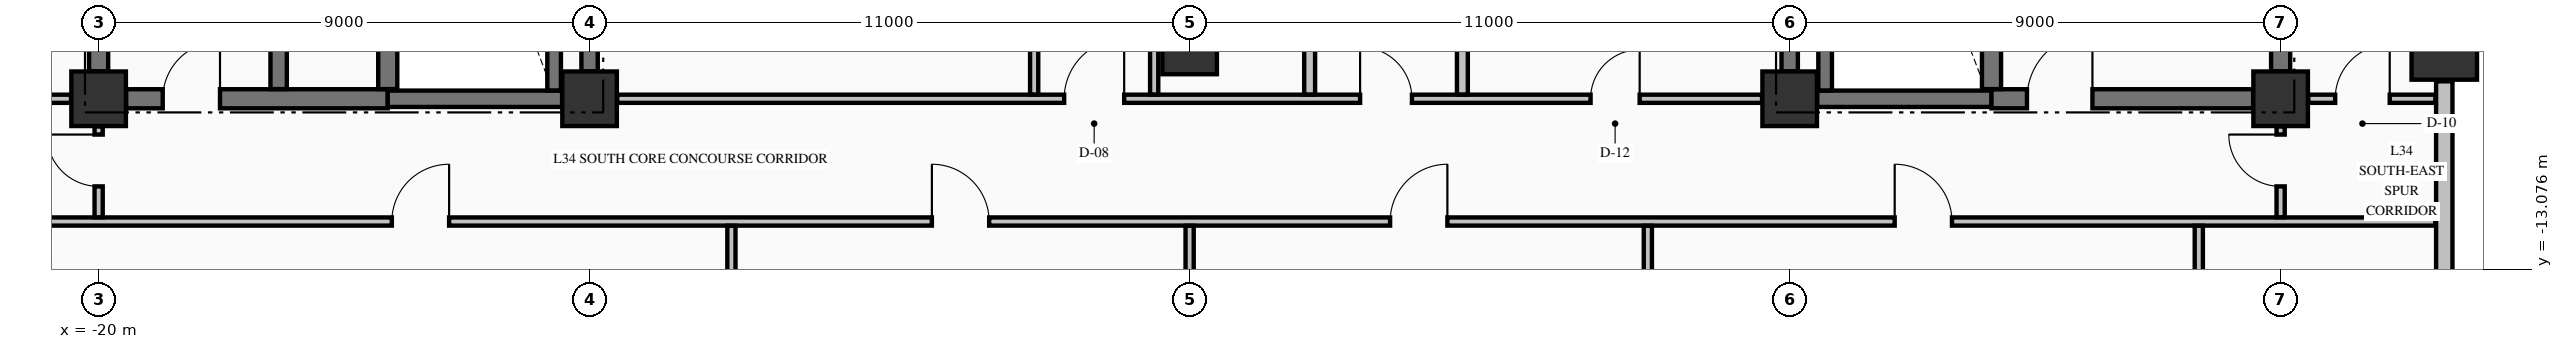
"""IFC4 building model, lengths in metres.
Left out: names, types, materials, properties, quantities, classifications, styles, units other than length and angle.
Written with IfcOpenShell. Run it as: python <this file> out.ifc"""

import sys

from ifc_helpers import new_model, si_unit, direction, frame, frame_2d, origin, origin_2d, place, context, subcontext, project, spatial, rectangle, extrude, element, fill, save


model = new_model("IFC4")
c1 = context("Model", 3, precision=1e-05, world=origin(), true_north=direction((0.0, 1.0)))
c2 = subcontext(c1, "Body", "Model", "MODEL_VIEW")
j1 = project(units=[si_unit("LENGTHUNIT", "METRE"), si_unit("PLANEANGLEUNIT", "RADIAN")], contexts=[c1])
p1 = place(None, origin())
s1 = spatial("IfcSite", under=j1, at=p1, CompositionType="ELEMENT")
p2 = place(p1, origin())
s2 = spatial("IfcBuilding", under=s1, at=p2, CompositionType="ELEMENT")
p3 = place(p2, frame((0.0, 0.0, 135.63)))
s3 = spatial("IfcBuildingStorey", under=s2, at=p3, CompositionType="ELEMENT", Elevation=135.63)
p4 = place(p3, frame((23.0, -9.0, -0.25), z_axis=(0.0, 0.0, 1.0), x_axis=(1.0, 0.0, 0.0)))
e1 = element("IfcColumn", 1, at=p4, inside=s3, PredefinedType="COLUMN", context=c2, shape_type="SweptSolid", body=[
    extrude(rectangle(XDim=1.2, YDim=1.2, at=origin_2d()), origin(), (0.0, 0.0, 1.0), 3.57),
])
for number, where, z_axis, x_axis in (
    (2, (-20.0, -9.95, -0.25), (0.0, 0.0, 1.0), (1.0, 0.0, 0.0)),
    (3, (-11.0, -9.95, -0.25), (0.0, 0.0, 1.0), (1.0, 0.0, 0.0)),
    (4, (11.0, -9.95, -0.25), (0.0, 0.0, 1.0), (1.0, 0.0, 0.0)),
    (5, (20.0, -9.95, -0.25), (0.0, 0.0, 1.0), (1.0, 0.0, 0.0)),
    (6, (0.0, -9.0, -0.25), (0.0, 0.0, 1.0), (1.0, 0.0, 0.0)),
):
    element("IfcColumn", number, at=place(p3, frame(where, z_axis=z_axis, x_axis=x_axis)), inside=s3, PredefinedType="COLUMN", context=c2, shape_type="SweptSolid", body=[
        extrude(rectangle(XDim=1.0, YDim=1.0, at=origin_2d()), origin(), (0.0, 0.0, 1.0), 3.57),
    ])
p5 = place(p3, frame((23.0, -20.37, 0.0), z_axis=(0.0, 0.0, 1.0), x_axis=(0.0, 1.0, 0.0)))
e7 = element("IfcWall", 7, at=p5, inside=s3, PredefinedType="STANDARD", context=c2, shape_type="SweptSolid", body=[
    extrude(rectangle(XDim=10.74, YDim=0.3, at=frame_2d((5.37, 0.0))), origin(), (0.0, 0.0, 1.0), 2.712),
])
p6 = place(p3, frame((-19.496, -9.95, 0.0), z_axis=(0.0, 0.0, 1.0), x_axis=(1.0, 0.0, 0.0)))
e8 = element("IfcWall", 8, at=p6, inside=s3, PredefinedType="SHEAR", context=c2, shape_type="SweptSolid", body=[
    extrude(rectangle(XDim=4.796, YDim=0.35, at=frame_2d((2.398, 0.0))), origin(), (0.0, 0.0, 1.0), 3.32),
])
p7 = place(p6, frame((0.671, 0.0, 0.0)))
e9 = element("IfcOpeningElement", 9, at=p7, cuts=e8, PredefinedType="OPENING", context=c2, shape_type="SweptSolid", body=[
    extrude(rectangle(XDim=1.05, YDim=2.15, at=frame_2d((0.525, 1.075))), frame((0.0, 0.185, 0.0), z_axis=(0.0, -1.0, 0.0), x_axis=(1.0, 0.0, 0.0)), (0.0, 0.0, 1.0), 0.37),
])
for number, where, z_axis, x_axis in (
    (10, (-14.7, -9.95, 0.0), (0.0, 0.0, 1.0), (1.0, 0.0, 0.0)),
    (11, (11.504, -9.95, 0.0), (0.0, 0.0, 1.0), (1.0, 0.0, 0.0)),
):
    element("IfcWall", number, at=place(p3, frame(where, z_axis=z_axis, x_axis=x_axis)), inside=s3, PredefinedType="SHEAR", context=c2, shape_type="SweptSolid", body=[
        extrude(rectangle(XDim=3.196, YDim=0.3, at=frame_2d((1.598, 0.0))), origin(), (0.0, 0.0, 1.0), 3.32),
    ])
p8 = place(p3, frame((14.7, -9.95, 0.0), z_axis=(0.0, 0.0, 1.0), x_axis=(1.0, 0.0, 0.0)))
e12 = element("IfcWall", 12, at=p8, inside=s3, PredefinedType="SHEAR", context=c2, shape_type="SweptSolid", body=[
    extrude(rectangle(XDim=4.796, YDim=0.35, at=frame_2d((2.398, 0.0))), origin(), (0.0, 0.0, 1.0), 3.32),
])
p9 = place(p8, frame((0.65, 0.0, 0.0)))
e13 = element("IfcOpeningElement", 13, at=p9, cuts=e12, PredefinedType="OPENING", context=c2, shape_type="SweptSolid", body=[
    extrude(rectangle(XDim=1.2, YDim=2.15, at=frame_2d((0.6, 1.075))), frame((0.0, 0.185, 0.0), z_axis=(0.0, -1.0, 0.0), x_axis=(1.0, 0.0, 0.0)), (0.0, 0.0, 1.0), 0.37),
])
p10 = place(p3, frame((-27.835, -12.2, 0.0), z_axis=(0.0, 0.0, 1.0), x_axis=(1.0, 0.0, 0.0)))
e14 = element("IfcWall", 14, at=p10, inside=s3, PredefinedType="PARTITIONING", context=c2, shape_type="SweptSolid", body=[
    extrude(rectangle(XDim=50.67, YDim=0.15, at=frame_2d((25.335, 0.0))), origin(), (0.0, 0.0, 1.0), 3.32),
])
p11 = place(p10, frame((13.21, 0.0, 0.0)))
e15 = element("IfcOpeningElement", 15, at=p11, cuts=e14, PredefinedType="OPENING", context=c2, shape_type="SweptSolid", body=[
    extrude(rectangle(XDim=1.05, YDim=2.15, at=frame_2d((0.525, 1.075))), frame((0.0, 0.085, 0.0), z_axis=(0.0, -1.0, 0.0), x_axis=(1.0, 0.0, 0.0)), (0.0, 0.0, 1.0), 0.17),
])
p12 = place(p10, frame((23.11, 0.0, 0.0)))
e16 = element("IfcOpeningElement", 16, at=p12, cuts=e14, PredefinedType="OPENING", context=c2, shape_type="SweptSolid", body=[
    extrude(rectangle(XDim=1.05, YDim=2.15, at=frame_2d((0.525, 1.075))), frame((0.0, 0.085, 0.0), z_axis=(0.0, -1.0, 0.0), x_axis=(1.0, 0.0, 0.0)), (0.0, 0.0, 1.0), 0.17),
])
p13 = place(p10, frame((31.51, 0.0, 0.0)))
e17 = element("IfcOpeningElement", 17, at=p13, cuts=e14, PredefinedType="OPENING", context=c2, shape_type="SweptSolid", body=[
    extrude(rectangle(XDim=1.05, YDim=2.15, at=frame_2d((0.525, 1.075))), frame((0.0, 0.085, 0.0), z_axis=(0.0, -1.0, 0.0), x_axis=(1.0, 0.0, 0.0)), (0.0, 0.0, 1.0), 0.17),
])
p14 = place(p10, frame((40.76, 0.0, 0.0)))
e18 = element("IfcOpeningElement", 18, at=p14, cuts=e14, PredefinedType="OPENING", context=c2, shape_type="SweptSolid", body=[
    extrude(rectangle(XDim=1.05, YDim=2.15, at=frame_2d((0.525, 1.075))), frame((0.0, 0.085, 0.0), z_axis=(0.0, -1.0, 0.0), x_axis=(1.0, 0.0, 0.0)), (0.0, 0.0, 1.0), 0.17),
])
p15 = place(p3, frame((-27.835, -9.95, 0.0), z_axis=(0.0, 0.0, 1.0), x_axis=(1.0, 0.0, 0.0)))
e19 = element("IfcWall", 19, at=p15, inside=s3, PredefinedType="PARTITIONING", context=c2, shape_type="SweptSolid", body=[
    extrude(rectangle(XDim=7.329, YDim=0.15, at=frame_2d((3.665, 0.0))), origin(), (0.0, 0.0, 1.0), 3.32),
])
p16 = place(p15, frame((3.36, 0.0, 0.0)))
e20 = element("IfcOpeningElement", 20, at=p16, cuts=e19, PredefinedType="OPENING", context=c2, shape_type="SweptSolid", body=[
    extrude(rectangle(XDim=0.95, YDim=2.15, at=frame_2d((0.475, 1.075))), frame((0.0, 0.085, 0.0), z_axis=(0.0, -1.0, 0.0), x_axis=(1.0, 0.0, 0.0)), (0.0, 0.0, 1.0), 0.17),
])
p17 = place(p3, frame((-10.494, -9.95, 0.0), z_axis=(0.0, 0.0, 1.0), x_axis=(1.0, 0.0, 0.0)))
e21 = element("IfcWall", 21, at=p17, inside=s3, PredefinedType="PARTITIONING", context=c2, shape_type="SweptSolid", body=[
    extrude(rectangle(XDim=20.988, YDim=0.15, at=frame_2d((10.494, 0.0))), origin(), (0.0, 0.0, 1.0), 3.32),
])
p18 = place(p17, frame((8.194, 0.0, 0.0)))
e22 = element("IfcOpeningElement", 22, at=p18, cuts=e21, PredefinedType="OPENING", context=c2, shape_type="SweptSolid", body=[
    extrude(rectangle(XDim=1.1, YDim=2.15, at=frame_2d((0.55, 1.075))), frame((0.0, 0.085, 0.0), z_axis=(0.0, -1.0, 0.0), x_axis=(1.0, 0.0, 0.0)), (0.0, 0.0, 1.0), 0.17),
])
p19 = place(p17, frame((13.619, 0.0, 0.0)))
e23 = element("IfcOpeningElement", 23, at=p19, cuts=e21, PredefinedType="OPENING", context=c2, shape_type="SweptSolid", body=[
    extrude(rectangle(XDim=0.95, YDim=2.15, at=frame_2d((0.475, 1.075))), frame((0.0, 0.085, 0.0), z_axis=(0.0, -1.0, 0.0), x_axis=(1.0, 0.0, 0.0)), (0.0, 0.0, 1.0), 0.17),
])
p20 = place(p17, frame((17.844, 0.0, 0.0)))
e24 = element("IfcOpeningElement", 24, at=p20, cuts=e21, PredefinedType="OPENING", context=c2, shape_type="SweptSolid", body=[
    extrude(rectangle(XDim=0.9, YDim=2.15, at=frame_2d((0.45, 1.075))), frame((0.0, 0.085, 0.0), z_axis=(0.0, -1.0, 0.0), x_axis=(1.0, 0.0, 0.0)), (0.0, 0.0, 1.0), 0.17),
])
p21 = place(p3, frame((20.506, -9.95, 0.0), z_axis=(0.0, 0.0, 1.0), x_axis=(1.0, 0.0, 0.0)))
e25 = element("IfcWall", 25, at=p21, inside=s3, PredefinedType="PARTITIONING", context=c2, shape_type="SweptSolid", body=[
    extrude(rectangle(XDim=2.329, YDim=0.15, at=frame_2d((1.165, 0.0))), origin(), (0.0, 0.0, 1.0), 3.32),
])
p22 = place(p21, frame((0.494, 0.0, 0.0)))
e26 = element("IfcOpeningElement", 26, at=p22, cuts=e25, PredefinedType="OPENING", context=c2, shape_type="SweptSolid", body=[
    extrude(rectangle(XDim=1.0, YDim=2.15, at=frame_2d((0.5, 1.075))), frame((0.0, 0.085, 0.0), z_axis=(0.0, -1.0, 0.0), x_axis=(1.0, 0.0, 0.0)), (0.0, 0.0, 1.0), 0.17),
])
p23 = place(p3, frame((-20.0, -9.446, 0.0), z_axis=(0.0, 0.0, 1.0), x_axis=(0.0, 1.0, 0.0)))
e27 = element("IfcWall", 27, at=p23, inside=s3, PredefinedType="SHEAR", context=c2, shape_type="SweptSolid", body=[
    extrude(rectangle(XDim=8.942, YDim=0.35, at=frame_2d((4.471, 0.0))), origin(), (0.0, 0.0, 1.0), 3.32),
])
p24 = place(p3, frame((-16.7, -9.773, 0.0), z_axis=(0.0, 0.0, 1.0), x_axis=(0.0, 1.0, 0.0)))
e28 = element("IfcWall", 28, at=p24, inside=s3, PredefinedType="SHEAR", context=c2, shape_type="SweptSolid", body=[
    extrude(rectangle(XDim=9.371, YDim=0.3, at=frame_2d((4.686, 0.0))), origin(), (0.0, 0.0, 1.0), 3.32),
])
p25 = place(p3, frame((-14.7, -9.773, 0.0), z_axis=(0.0, 0.0, 1.0), x_axis=(0.0, 1.0, 0.0)))
e29 = element("IfcWall", 29, at=p25, inside=s3, PredefinedType="SHEAR", context=c2, shape_type="SweptSolid", body=[
    extrude(rectangle(XDim=9.371, YDim=0.35, at=frame_2d((4.686, 0.0))), origin(), (0.0, 0.0, 1.0), 3.32),
])
p26 = place(p3, frame((-11.65, -9.798, 0.0), z_axis=(0.0, 0.0, 1.0), x_axis=(0.0, 1.0, 0.0)))
e30 = element("IfcWall", 30, at=p26, inside=s3, PredefinedType="SOLIDWALL", context=c2, shape_type="SweptSolid", body=[
    extrude(rectangle(XDim=9.396, YDim=0.25, at=frame_2d((4.698, 0.0))), origin(), (0.0, 0.0, 1.0), 3.32),
])
for number, where, z_axis, x_axis in (
    (31, (-11.0, -9.446, 0.0), (0.0, 0.0, 1.0), (0.0, 1.0, 0.0)),
    (32, (11.0, -9.446, 0.0), (0.0, 0.0, 1.0), (0.0, 1.0, 0.0)),
):
    element("IfcWall", number, at=place(p3, frame(where, z_axis=z_axis, x_axis=x_axis)), inside=s3, PredefinedType="SHEAR", context=c2, shape_type="SweptSolid", body=[
        extrude(rectangle(XDim=8.942, YDim=0.3, at=frame_2d((4.471, 0.0))), origin(), (0.0, 0.0, 1.0), 3.32),
    ])
p27 = place(p3, frame((11.65, -9.798, 0.0), z_axis=(0.0, 0.0, 1.0), x_axis=(0.0, 1.0, 0.0)))
e33 = element("IfcWall", 33, at=p27, inside=s3, PredefinedType="SOLIDWALL", context=c2, shape_type="SweptSolid", body=[
    extrude(rectangle(XDim=9.396, YDim=0.25, at=frame_2d((4.698, 0.0))), origin(), (0.0, 0.0, 1.0), 3.32),
])
p28 = place(p3, frame((14.7, -9.773, 0.0), z_axis=(0.0, 0.0, 1.0), x_axis=(0.0, 1.0, 0.0)))
e34 = element("IfcWall", 34, at=p28, inside=s3, PredefinedType="SHEAR", context=c2, shape_type="SweptSolid", body=[
    extrude(rectangle(XDim=9.371, YDim=0.35, at=frame_2d((4.686, 0.0))), origin(), (0.0, 0.0, 1.0), 3.32),
])
p29 = place(p3, frame((20.0, -9.446, 0.0), z_axis=(0.0, 0.0, 1.0), x_axis=(0.0, 1.0, 0.0)))
e35 = element("IfcWall", 35, at=p29, inside=s3, PredefinedType="SHEAR", context=c2, shape_type="SweptSolid", body=[
    extrude(rectangle(XDim=2.269, YDim=0.35, at=frame_2d((1.135, 0.0))), origin(), (0.0, 0.0, 1.0), 3.32),
])
p30 = place(p3, frame((-20.0, -12.122, 0.0), z_axis=(0.0, 0.0, 1.0), x_axis=(0.0, 1.0, 0.0)))
e36 = element("IfcWall", 36, at=p30, inside=s3, PredefinedType="PARTITIONING", context=c2, shape_type="SweptSolid", body=[
    extrude(rectangle(XDim=1.666, YDim=0.15, at=frame_2d((0.833, 0.0))), origin(), (0.0, 0.0, 1.0), 2.81),
])
p31 = place(p30, frame((0.566, 0.0, 0.0)))
e37 = element("IfcOpeningElement", 37, at=p31, cuts=e36, PredefinedType="OPENING", context=c2, shape_type="SweptSolid", body=[
    extrude(rectangle(XDim=0.95, YDim=2.15, at=frame_2d((0.475, 1.075))), frame((0.0, 0.085, 0.0), z_axis=(0.0, -1.0, 0.0), x_axis=(1.0, 0.0, 0.0)), (0.0, 0.0, 1.0), 0.17),
])
p32 = place(p3, frame((-8.4, -25.335, 0.0), z_axis=(0.0, 0.0, 1.0), x_axis=(0.0, 1.0, 0.0)))
e38 = element("IfcWall", 38, at=p32, inside=s3, PredefinedType="PARTITIONING", context=c2, shape_type="SweptSolid", body=[
    extrude(rectangle(XDim=13.057, YDim=0.15, at=frame_2d((6.528, 0.0))), origin(), (0.0, 0.0, 1.0), 3.32),
])
p33 = place(p3, frame((-2.85, -9.872, 0.0), z_axis=(0.0, 0.0, 1.0), x_axis=(0.0, 1.0, 0.0)))
e39 = element("IfcWall", 39, at=p33, inside=s3, PredefinedType="PARTITIONING", context=c2, shape_type="SweptSolid", body=[
    extrude(rectangle(XDim=9.544, YDim=0.15, at=frame_2d((4.772, 0.0))), origin(), (0.0, 0.0, 1.0), 3.32),
])
p34 = place(p3, frame((-0.65, -9.872, 0.0), z_axis=(0.0, 0.0, 1.0), x_axis=(0.0, 1.0, 0.0)))
e40 = element("IfcWall", 40, at=p34, inside=s3, PredefinedType="PARTITIONING", context=c2, shape_type="SweptSolid", body=[
    extrude(rectangle(XDim=4.419, YDim=0.15, at=frame_2d((2.209, 0.0))), origin(), (0.0, 0.0, 1.0), 3.32),
])
p35 = place(p34, frame((2.597, 0.0, 0.0)))
e41 = element("IfcOpeningElement", 41, at=p35, cuts=e40, PredefinedType="OPENING", context=c2, shape_type="SweptSolid", body=[
    extrude(rectangle(XDim=0.95, YDim=2.15, at=frame_2d((0.475, 1.075))), frame((0.0, 0.085, 0.0), z_axis=(0.0, -1.0, 0.0), x_axis=(1.0, 0.0, 0.0)), (0.0, 0.0, 1.0), 0.17),
])
p36 = place(p3, frame((0.0, -24.894, 0.0), z_axis=(0.0, 0.0, 1.0), x_axis=(0.0, 1.0, 0.0)))
e42 = element("IfcWall", 42, at=p36, inside=s3, PredefinedType="PARTITIONING", context=c2, shape_type="SweptSolid", body=[
    extrude(rectangle(XDim=12.616, YDim=0.15, at=frame_2d((6.308, 0.0))), origin(), (0.0, 0.0, 1.0), 2.81),
])
for number, where, z_axis, x_axis in (
    (43, (2.2, -9.872, 0.0), (0.0, 0.0, 1.0), (0.0, 1.0, 0.0)),
    (44, (5.0, -9.872, 0.0), (0.0, 0.0, 1.0), (0.0, 1.0, 0.0)),
):
    element("IfcWall", number, at=place(p3, frame(where, z_axis=z_axis, x_axis=x_axis)), inside=s3, PredefinedType="PARTITIONING", context=c2, shape_type="SweptSolid", body=[
        extrude(rectangle(XDim=4.419, YDim=0.2, at=frame_2d((2.209, 0.0))), origin(), (0.0, 0.0, 1.0), 3.32),
    ])
p37 = place(p3, frame((8.4, -25.335, 0.0), z_axis=(0.0, 0.0, 1.0), x_axis=(0.0, 1.0, 0.0)))
e45 = element("IfcWall", 45, at=p37, inside=s3, PredefinedType="PARTITIONING", context=c2, shape_type="SweptSolid", body=[
    extrude(rectangle(XDim=13.057, YDim=0.15, at=frame_2d((6.528, 0.0))), origin(), (0.0, 0.0, 1.0), 3.32),
])
p38 = place(p3, frame((18.5, -20.394, 0.0), z_axis=(0.0, 0.0, 1.0), x_axis=(0.0, 1.0, 0.0)))
e46 = element("IfcWall", 46, at=p38, inside=s3, PredefinedType="PARTITIONING", context=c2, shape_type="SweptSolid", body=[
    extrude(rectangle(XDim=8.116, YDim=0.15, at=frame_2d((4.058, 0.0))), origin(), (0.0, 0.0, 1.0), 3.32),
])
p39 = place(p3, frame((20.0, -12.122, 0.0), z_axis=(0.0, 0.0, 1.0), x_axis=(0.0, 1.0, 0.0)))
e47 = element("IfcWall", 47, at=p39, inside=s3, PredefinedType="PARTITIONING", context=c2, shape_type="SweptSolid", body=[
    extrude(rectangle(XDim=1.666, YDim=0.15, at=frame_2d((0.833, 0.0))), origin(), (0.0, 0.0, 1.0), 2.81),
])
p40 = place(p39, frame((0.566, 0.0, 0.0)))
e48 = element("IfcOpeningElement", 48, at=p40, cuts=e47, PredefinedType="OPENING", context=c2, shape_type="SweptSolid", body=[
    extrude(rectangle(XDim=0.95, YDim=2.15, at=frame_2d((0.475, 1.075))), frame((0.0, 0.085, 0.0), z_axis=(0.0, -1.0, 0.0), x_axis=(1.0, 0.0, 0.0)), (0.0, 0.0, 1.0), 0.17),
])
p41 = place(p7, origin())
e49 = element("IfcDoor", 49, at=p41, inside=s3, OperationType="SINGLE_SWING_RIGHT", PredefinedType="DOOR", context=c2, shape_type="SweptSolid", body=[
    extrude(rectangle(XDim=1.05, YDim=2.15, at=frame_2d((0.525, 1.075))), frame((0.0, 0.025, 0.0), z_axis=(0.0, -1.0, 0.0), x_axis=(1.0, 0.0, 0.0)), (0.0, 0.0, 1.0), 0.05),
])
fill(e9, e49)
p42 = place(p9, origin())
e50 = element("IfcDoor", 50, at=p42, inside=s3, OperationType="SINGLE_SWING_RIGHT", PredefinedType="DOOR", context=c2, shape_type="SweptSolid", body=[
    extrude(rectangle(XDim=1.2, YDim=2.15, at=frame_2d((0.6, 1.075))), frame((0.0, 0.025, 0.0), z_axis=(0.0, -1.0, 0.0), x_axis=(1.0, 0.0, 0.0)), (0.0, 0.0, 1.0), 0.05),
])
fill(e13, e50)
p43 = place(p18, origin())
e51 = element("IfcDoor", 51, at=p43, inside=s3, OperationType="SINGLE_SWING_RIGHT", PredefinedType="DOOR", context=c2, shape_type="SweptSolid", body=[
    extrude(rectangle(XDim=1.1, YDim=2.15, at=frame_2d((0.55, 1.075))), frame((0.0, 0.025, 0.0), z_axis=(0.0, -1.0, 0.0), x_axis=(1.0, 0.0, 0.0)), (0.0, 0.0, 1.0), 0.05),
])
fill(e22, e51)
p44 = place(p11, origin())
e52 = element("IfcDoor", 52, at=p44, inside=s3, OperationType="SINGLE_SWING_RIGHT", PredefinedType="DOOR", context=c2, shape_type="SweptSolid", body=[
    extrude(rectangle(XDim=1.05, YDim=2.15, at=frame_2d((0.525, 1.075))), frame((0.0, 0.025, 0.0), z_axis=(0.0, -1.0, 0.0), x_axis=(1.0, 0.0, 0.0)), (0.0, 0.0, 1.0), 0.05),
])
fill(e15, e52)
p45 = place(p12, origin())
e53 = element("IfcDoor", 53, at=p45, inside=s3, OperationType="SINGLE_SWING_LEFT", PredefinedType="DOOR", context=c2, shape_type="SweptSolid", body=[
    extrude(rectangle(XDim=1.05, YDim=2.15, at=frame_2d((0.525, 1.075))), frame((0.0, 0.025, 0.0), z_axis=(0.0, -1.0, 0.0), x_axis=(1.0, 0.0, 0.0)), (0.0, 0.0, 1.0), 0.05),
])
fill(e16, e53)
p46 = place(p13, origin())
e54 = element("IfcDoor", 54, at=p46, inside=s3, OperationType="SINGLE_SWING_RIGHT", PredefinedType="DOOR", context=c2, shape_type="SweptSolid", body=[
    extrude(rectangle(XDim=1.05, YDim=2.15, at=frame_2d((0.525, 1.075))), frame((0.0, 0.025, 0.0), z_axis=(0.0, -1.0, 0.0), x_axis=(1.0, 0.0, 0.0)), (0.0, 0.0, 1.0), 0.05),
])
fill(e17, e54)
p47 = place(p14, origin())
e55 = element("IfcDoor", 55, at=p47, inside=s3, OperationType="SINGLE_SWING_LEFT", PredefinedType="DOOR", context=c2, shape_type="SweptSolid", body=[
    extrude(rectangle(XDim=1.05, YDim=2.15, at=frame_2d((0.525, 1.075))), frame((0.0, 0.025, 0.0), z_axis=(0.0, -1.0, 0.0), x_axis=(1.0, 0.0, 0.0)), (0.0, 0.0, 1.0), 0.05),
])
fill(e18, e55)
p48 = place(p19, origin())
e56 = element("IfcDoor", 56, at=p48, inside=s3, OperationType="SINGLE_SWING_LEFT", PredefinedType="DOOR", context=c2, shape_type="SweptSolid", body=[
    extrude(rectangle(XDim=0.95, YDim=2.15, at=frame_2d((0.475, 1.075))), frame((0.0, 0.025, 0.0), z_axis=(0.0, -1.0, 0.0), x_axis=(1.0, 0.0, 0.0)), (0.0, 0.0, 1.0), 0.05),
])
fill(e23, e56)
p49 = place(p20, origin())
e57 = element("IfcDoor", 57, at=p49, inside=s3, OperationType="SINGLE_SWING_RIGHT", PredefinedType="DOOR", context=c2, shape_type="SweptSolid", body=[
    extrude(rectangle(XDim=0.9, YDim=2.15, at=frame_2d((0.45, 1.075))), frame((0.0, 0.025, 0.0), z_axis=(0.0, -1.0, 0.0), x_axis=(1.0, 0.0, 0.0)), (0.0, 0.0, 1.0), 0.05),
])
fill(e24, e57)
p50 = place(p31, origin())
e58 = element("IfcDoor", 58, at=p50, inside=s3, OperationType="SINGLE_SWING_RIGHT", PredefinedType="DOOR", context=c2, shape_type="SweptSolid", body=[
    extrude(rectangle(XDim=0.95, YDim=2.15, at=frame_2d((0.475, 1.075))), frame((0.0, 0.025, 0.0), z_axis=(0.0, -1.0, 0.0), x_axis=(1.0, 0.0, 0.0)), (0.0, 0.0, 1.0), 0.05),
])
fill(e37, e58)
p51 = place(p40, origin())
e59 = element("IfcDoor", 59, at=p51, inside=s3, OperationType="SINGLE_SWING_RIGHT", PredefinedType="DOOR", context=c2, shape_type="SweptSolid", body=[
    extrude(rectangle(XDim=0.95, YDim=2.15, at=frame_2d((0.475, 1.075))), frame((0.0, 0.025, 0.0), z_axis=(0.0, -1.0, 0.0), x_axis=(1.0, 0.0, 0.0)), (0.0, 0.0, 1.0), 0.05),
])
fill(e48, e59)
p52 = place(p22, origin())
e60 = element("IfcDoor", 60, at=p52, inside=s3, OperationType="SINGLE_SWING_RIGHT", PredefinedType="DOOR", context=c2, shape_type="SweptSolid", body=[
    extrude(rectangle(XDim=1.0, YDim=2.15, at=frame_2d((0.5, 1.075))), frame((0.0, 0.025, 0.0), z_axis=(0.0, -1.0, 0.0), x_axis=(1.0, 0.0, 0.0)), (0.0, 0.0, 1.0), 0.05),
])
fill(e26, e60)
save(model, sys.argv[1])
